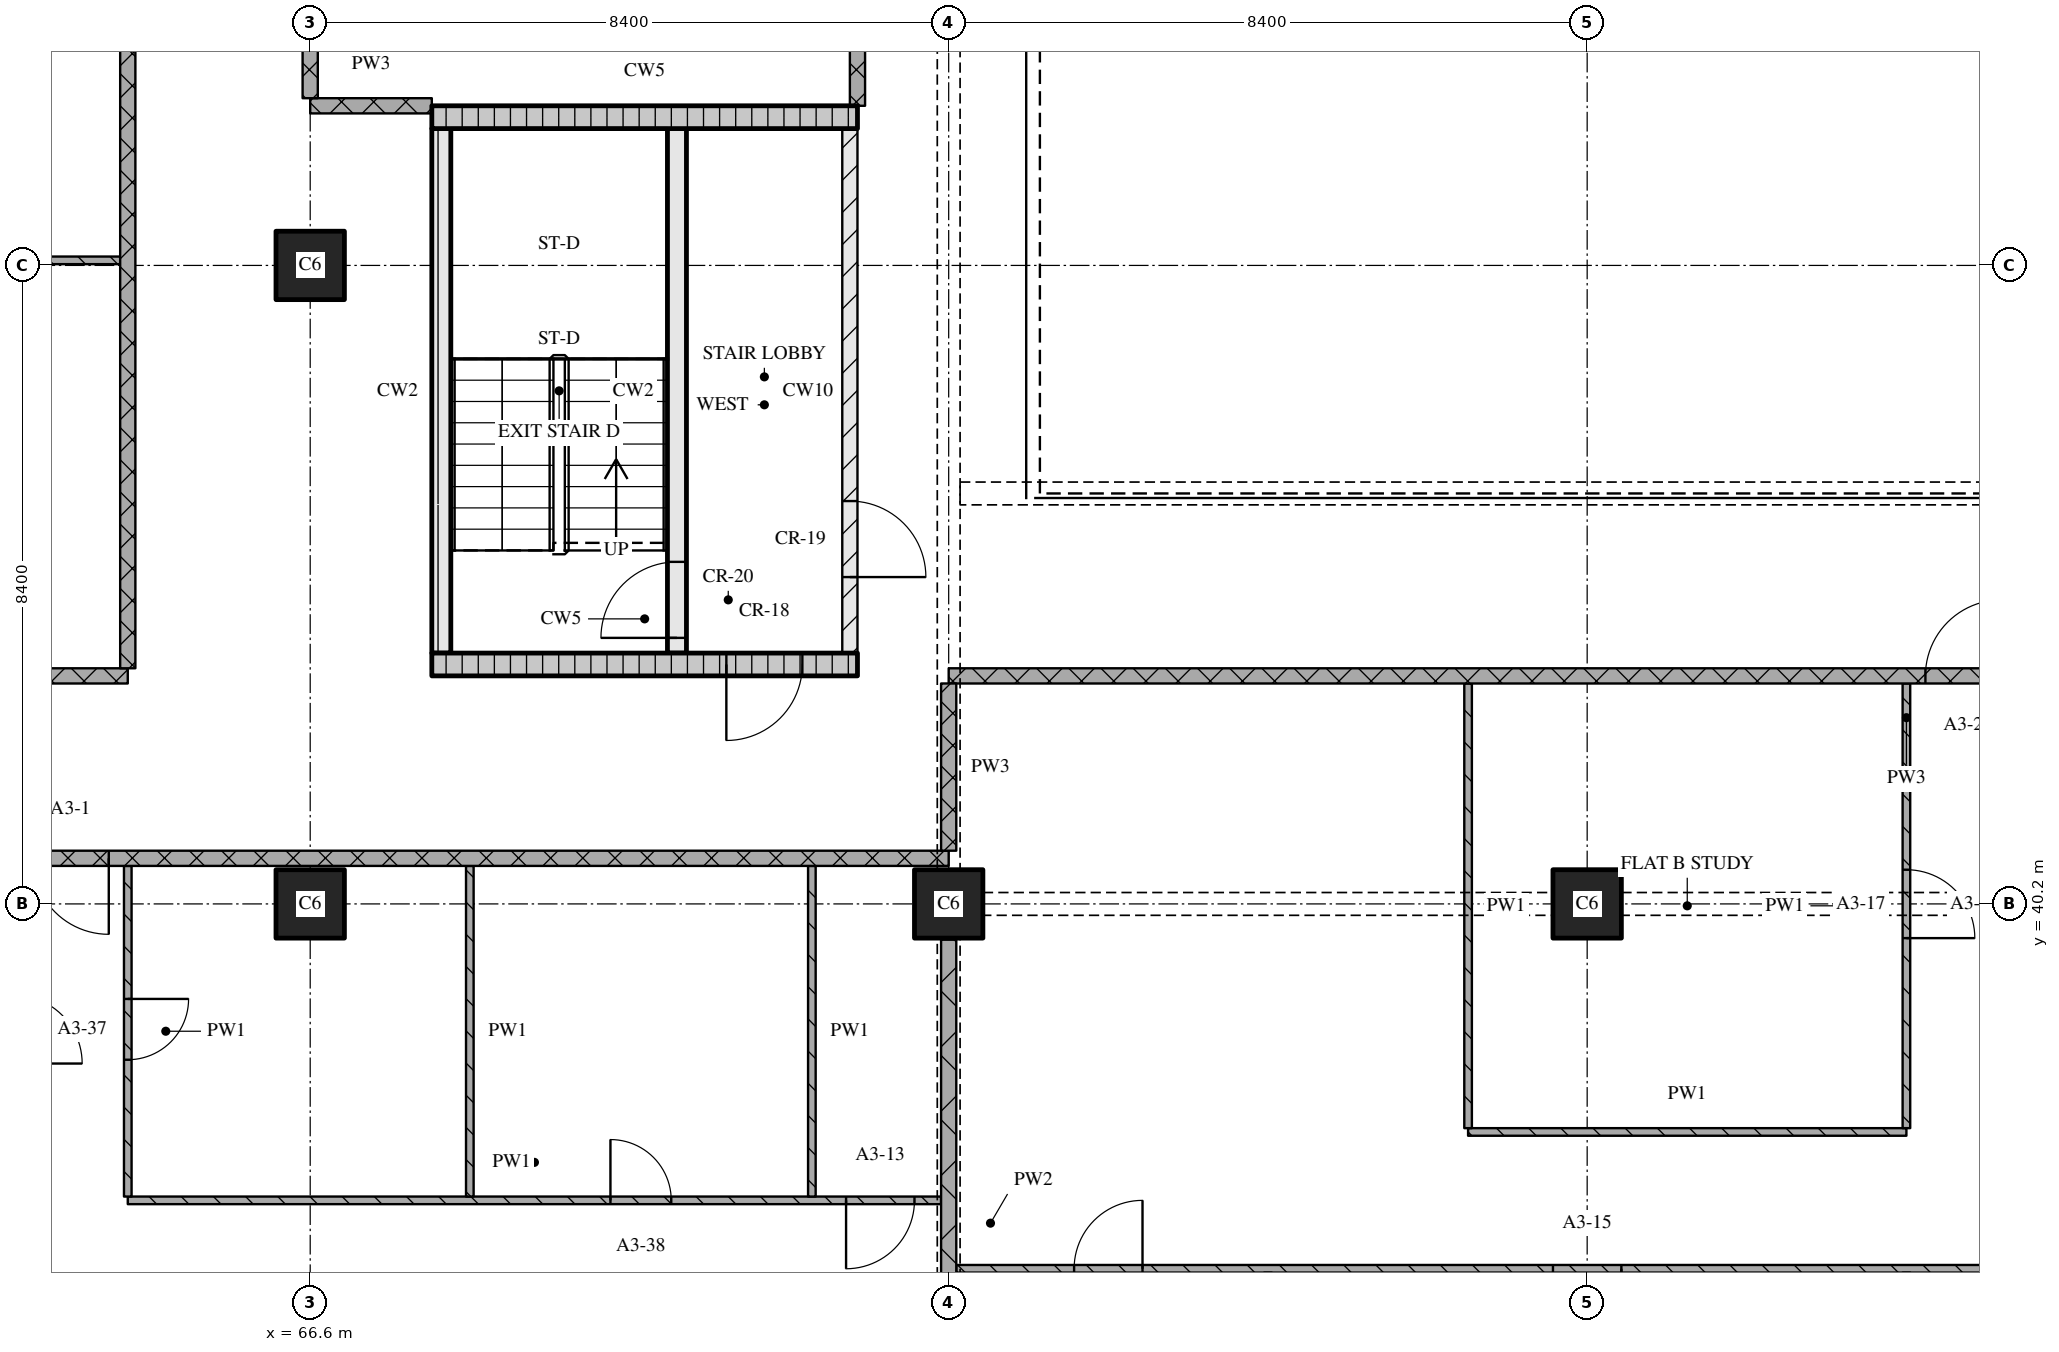
"""IFC4 building model, lengths in metres.
Left out: names, types, materials, properties, quantities, classifications, styles, units other than length and angle.
Written with IfcOpenShell. Run it as: python <this file> out.ifc"""

import sys

from ifc_helpers import new_model, si_unit, direction, frame, frame_2d, origin, origin_2d, place, context, subcontext, project, spatial, rectangle, extrude, element, fill, save


model = new_model("IFC4")
c1 = context("Model", 3, precision=1e-05, world=origin(), true_north=direction((0.0, 1.0)))
c2 = subcontext(c1, "Body", "Model", "MODEL_VIEW")
j1 = project(units=[si_unit("LENGTHUNIT", "METRE"), si_unit("PLANEANGLEUNIT", "RADIAN")], contexts=[c1])
p1 = place(None, origin())
s1 = spatial("IfcSite", under=j1, at=p1, CompositionType="ELEMENT")
p2 = place(p1, origin())
s2 = spatial("IfcBuilding", under=s1, at=p2, CompositionType="ELEMENT")
p3 = place(p2, frame((0.0, 0.0, 62.4)))
s3 = spatial("IfcBuildingStorey", under=s2, at=p3, CompositionType="ELEMENT", Elevation=62.4)
for number, where, z_axis, x_axis in (
    (1, (66.6, 40.2, 0.0), (0.0, 0.0, 1.0), (1.0, 0.0, 0.0)),
    (2, (66.6, 48.6, 0.0), (0.0, 0.0, 1.0), (1.0, 0.0, 0.0)),
    (3, (75.0, 40.2, 0.0), (0.0, 0.0, 1.0), (1.0, 0.0, 0.0)),
    (4, (83.4, 40.2, 0.0), (0.0, 0.0, 1.0), (1.0, 0.0, 0.0)),
):
    element("IfcColumn", number, at=place(p3, frame(where, z_axis=z_axis, x_axis=x_axis)), inside=s3, PredefinedType="COLUMN", context=c2, shape_type="SweptSolid", body=[
        extrude(rectangle(XDim=0.9, YDim=0.9, at=origin_2d()), origin(), (0.0, 0.0, 1.0), 3.6),
    ])
p4 = place(p3, frame((68.2, 43.35, 0.0), z_axis=(0.0, 0.0, 1.0), x_axis=(1.0, 0.0, 0.0)))
e5 = element("IfcWall", 5, at=p4, inside=s3, PredefinedType="SOLIDWALL", context=c2, shape_type="SweptSolid", body=[
    extrude(rectangle(XDim=5.6, YDim=0.3, at=frame_2d((2.8, 0.0))), origin(), (0.0, 0.0, 1.0), 3.32),
])
p5 = place(p4, frame((3.875, 0.0, 0.0)))
e6 = element("IfcOpeningElement", 6, at=p5, cuts=e5, PredefinedType="OPENING", context=c2, shape_type="SweptSolid", body=[
    extrude(rectangle(XDim=1.0, YDim=2.1, at=frame_2d((0.5, 1.05))), frame((0.0, 0.16, 0.0), z_axis=(0.0, -1.0, 0.0), x_axis=(1.0, 0.0, 0.0)), (0.0, 0.0, 1.0), 0.32),
])
p6 = place(p3, frame((68.325, 43.5, 0.0), z_axis=(0.0, 0.0, 1.0), x_axis=(0.0, 1.0, 0.0)))
e7 = element("IfcWall", 7, at=p6, inside=s3, PredefinedType="SOLIDWALL", context=c2, shape_type="SweptSolid", body=[
    extrude(rectangle(XDim=6.9, YDim=0.25, at=frame_2d((3.45, 0.0))), origin(), (0.0, 0.0, 1.0), 3.32),
])
p7 = place(p3, frame((71.425, 43.5, 0.0), z_axis=(0.0, 0.0, 1.0), x_axis=(0.0, 1.0, 0.0)))
e8 = element("IfcWall", 8, at=p7, inside=s3, PredefinedType="SOLIDWALL", context=c2, shape_type="SweptSolid", body=[
    extrude(rectangle(XDim=6.9, YDim=0.25, at=frame_2d((3.45, 0.0))), origin(), (0.0, 0.0, 1.0), 3.32),
])
p8 = place(p7, frame((0.2, 0.0, 0.0)))
e9 = element("IfcOpeningElement", 9, at=p8, cuts=e8, PredefinedType="OPENING", context=c2, shape_type="SweptSolid", body=[
    extrude(rectangle(XDim=1.0, YDim=2.1, at=frame_2d((0.5, 1.05))), frame((0.0, 0.135, 0.0), z_axis=(0.0, -1.0, 0.0), x_axis=(1.0, 0.0, 0.0)), (0.0, 0.0, 1.0), 0.27),
])
p9 = place(p3, frame((73.7, 43.5, 0.0), z_axis=(0.0, 0.0, 1.0), x_axis=(0.0, 1.0, 0.0)))
e10 = element("IfcWall", 10, at=p9, inside=s3, PredefinedType="PARTITIONING", context=c2, shape_type="SweptSolid", body=[
    extrude(rectangle(XDim=6.9, YDim=0.2, at=frame_2d((3.45, 0.0))), origin(), (0.0, 0.0, 1.0), 3.32),
])
p10 = place(p9, frame((1.0, 0.0, 0.0)))
e11 = element("IfcOpeningElement", 11, at=p10, cuts=e10, PredefinedType="OPENING", context=c2, shape_type="SweptSolid", body=[
    extrude(rectangle(XDim=1.0, YDim=2.1, at=frame_2d((0.5, 1.05))), frame((0.0, 0.11, 0.0), z_axis=(0.0, -1.0, 0.0), x_axis=(1.0, 0.0, 0.0)), (0.0, 0.0, 1.0), 0.22),
])
p11 = place(p3, frame((68.2, 50.55, 0.0), z_axis=(0.0, 0.0, 1.0), x_axis=(1.0, 0.0, 0.0)))
e12 = element("IfcWall", 12, at=p11, inside=s3, PredefinedType="SOLIDWALL", context=c2, shape_type="SweptSolid", body=[
    extrude(rectangle(XDim=5.6, YDim=0.3, at=frame_2d((2.8, 0.0))), origin(), (0.0, 0.0, 1.0), 3.32),
])
p12 = place(p3, frame((96.0, 35.4, 0.0), z_axis=(0.0, 0.0, 1.0), x_axis=(-1.0, 0.0, 0.0)))
e13 = element("IfcWall", 13, at=p12, inside=s3, PredefinedType="PARTITIONING", context=c2, shape_type="SweptSolid", body=[
    extrude(rectangle(XDim=20.9, YDim=0.1, at=frame_2d((10.45, 0.0))), origin(), (0.0, 0.0, 1.0), 3.32),
])
p13 = place(p12, frame((12.15, 0.0, 0.0)))
e14 = element("IfcOpeningElement", 14, at=p13, cuts=e13, PredefinedType="OPENING", context=c2, shape_type="SweptSolid", body=[
    extrude(rectangle(XDim=0.9, YDim=2.1, at=frame_2d((0.45, 1.05))), frame((0.0, 0.06, 0.0), z_axis=(0.0, -1.0, 0.0), x_axis=(1.0, 0.0, 0.0)), (0.0, 0.0, 1.0), 0.12),
])
p14 = place(p12, frame((18.45, 0.0, 0.0)))
e15 = element("IfcOpeningElement", 15, at=p14, cuts=e13, PredefinedType="OPENING", context=c2, shape_type="SweptSolid", body=[
    extrude(rectangle(XDim=0.9, YDim=2.1, at=frame_2d((0.45, 1.05))), frame((0.0, 0.06, 0.0), z_axis=(0.0, -1.0, 0.0), x_axis=(1.0, 0.0, 0.0)), (0.0, 0.0, 1.0), 0.12),
])
p15 = place(p3, frame((64.2, 36.3, 0.0), z_axis=(0.0, 0.0, 1.0), x_axis=(1.0, 0.0, 0.0)))
e16 = element("IfcWall", 16, at=p15, inside=s3, PredefinedType="PARTITIONING", context=c2, shape_type="SweptSolid", body=[
    extrude(rectangle(XDim=10.7, YDim=0.1, at=frame_2d((5.35, 0.0))), origin(), (0.0, 0.0, 1.0), 3.32),
])
p16 = place(p15, frame((6.35, 0.0, 0.0)))
e17 = element("IfcOpeningElement", 17, at=p16, cuts=e16, PredefinedType="OPENING", context=c2, shape_type="SweptSolid", body=[
    extrude(rectangle(XDim=0.8, YDim=2.1, at=frame_2d((0.4, 1.05))), frame((0.0, 0.06, 0.0), z_axis=(0.0, -1.0, 0.0), x_axis=(1.0, 0.0, 0.0)), (0.0, 0.0, 1.0), 0.12),
])
p17 = place(p15, frame((9.45, 0.0, 0.0)))
e18 = element("IfcOpeningElement", 18, at=p17, cuts=e16, PredefinedType="OPENING", context=c2, shape_type="SweptSolid", body=[
    extrude(rectangle(XDim=0.9, YDim=2.1, at=frame_2d((0.45, 1.05))), frame((0.0, 0.06, 0.0), z_axis=(0.0, -1.0, 0.0), x_axis=(1.0, 0.0, 0.0)), (0.0, 0.0, 1.0), 0.12),
])
p18 = place(p3, frame((81.833, 37.2, 0.0), z_axis=(0.0, 0.0, 1.0), x_axis=(1.0, 0.0, 0.0)))
e19 = element("IfcWall", 19, at=p18, inside=s3, PredefinedType="PARTITIONING", context=c2, shape_type="SweptSolid", body=[
    extrude(rectangle(XDim=5.767, YDim=0.1, at=frame_2d((2.883, 0.0))), origin(), (0.0, 0.0, 1.0), 3.32),
])
p19 = place(p3, frame((75.0, 40.8, 0.0), z_axis=(0.0, 0.0, 1.0), x_axis=(-1.0, 0.0, 0.0)))
e20 = element("IfcWall", 20, at=p19, inside=s3, PredefinedType="PARTITIONING", context=c2, shape_type="SweptSolid", body=[
    extrude(rectangle(XDim=24.08, YDim=0.2, at=frame_2d((12.04, 0.0))), origin(), (0.0, 0.0, 1.0), 3.32),
])
p20 = place(p19, frame((11.05, 0.0, 0.0)))
e21 = element("IfcOpeningElement", 21, at=p20, cuts=e20, PredefinedType="OPENING", context=c2, shape_type="SweptSolid", body=[
    extrude(rectangle(XDim=1.0, YDim=2.1, at=frame_2d((0.5, 1.05))), frame((0.0, 0.11, 0.0), z_axis=(0.0, -1.0, 0.0), x_axis=(1.0, 0.0, 0.0)), (0.0, 0.0, 1.0), 0.22),
])
p21 = place(p3, frame((48.28, 43.2, 0.0), z_axis=(0.0, 0.0, 1.0), x_axis=(1.0, 0.0, 0.0)))
e22 = element("IfcWall", 22, at=p21, inside=s3, PredefinedType="PARTITIONING", context=c2, shape_type="SweptSolid", body=[
    extrude(rectangle(XDim=15.92, YDim=0.2, at=frame_2d((7.96, 0.0))), origin(), (0.0, 0.0, 1.0), 3.32),
])
p22 = place(p3, frame((100.2, 43.2, 0.0), z_axis=(0.0, 0.0, 1.0), x_axis=(-1.0, 0.0, 0.0)))
e23 = element("IfcWall", 23, at=p22, inside=s3, PredefinedType="PARTITIONING", context=c2, shape_type="SweptSolid", body=[
    extrude(rectangle(XDim=25.2, YDim=0.2, at=frame_2d((12.6, 0.0))), origin(), (0.0, 0.0, 1.0), 3.32),
])
p23 = place(p22, frame((11.35, 0.0, 0.0)))
e24 = element("IfcOpeningElement", 24, at=p23, cuts=e23, PredefinedType="OPENING", context=c2, shape_type="SweptSolid", body=[
    extrude(rectangle(XDim=1.0, YDim=2.1, at=frame_2d((0.5, 1.05))), frame((0.0, 0.11, 0.0), z_axis=(0.0, -1.0, 0.0), x_axis=(1.0, 0.0, 0.0)), (0.0, 0.0, 1.0), 0.22),
])
p24 = place(p3, frame((58.67, 48.667, 0.0), z_axis=(0.0, 0.0, 1.0), x_axis=(1.0, 0.0, 0.0)))
e25 = element("IfcWall", 25, at=p24, inside=s3, PredefinedType="PARTITIONING", context=c2, shape_type="SweptSolid", body=[
    extrude(rectangle(XDim=5.43, YDim=0.1, at=frame_2d((2.715, 0.0))), origin(), (0.0, 0.0, 1.0), 3.32),
])
p25 = place(p3, frame((66.6, 50.7, 0.0), z_axis=(0.0, 0.0, 1.0), x_axis=(1.0, 0.0, 0.0)))
e26 = element("IfcWall", 26, at=p25, inside=s3, PredefinedType="PARTITIONING", context=c2, shape_type="SweptSolid", body=[
    extrude(rectangle(XDim=1.6, YDim=0.2, at=frame_2d((0.8, 0.0))), origin(), (0.0, 0.0, 1.0), 3.32),
])
p26 = place(p3, frame((64.2, 43.3, 0.0), z_axis=(0.0, 0.0, 1.0), x_axis=(0.0, 1.0, 0.0)))
e27 = element("IfcWall", 27, at=p26, inside=s3, PredefinedType="PARTITIONING", context=c2, shape_type="SweptSolid", body=[
    extrude(rectangle(XDim=32.02, YDim=0.2, at=frame_2d((16.01, 0.0))), origin(), (0.0, 0.0, 1.0), 3.32),
])
p27 = place(p26, frame((9.15, 0.0, 0.0)))
e28 = element("IfcOpeningElement", 28, at=p27, cuts=e27, PredefinedType="OPENING", context=c2, shape_type="SweptSolid", body=[
    extrude(rectangle(XDim=1.0, YDim=2.1, at=frame_2d((0.5, 1.05))), frame((0.0, 0.11, 0.0), z_axis=(0.0, -1.0, 0.0), x_axis=(1.0, 0.0, 0.0)), (0.0, 0.0, 1.0), 0.22),
])
p28 = place(p26, frame((19.05, 0.0, 0.0)))
e29 = element("IfcOpeningElement", 29, at=p28, cuts=e27, PredefinedType="OPENING", context=c2, shape_type="SweptSolid", body=[
    extrude(rectangle(XDim=1.0, YDim=2.1, at=frame_2d((0.5, 1.05))), frame((0.0, 0.11, 0.0), z_axis=(0.0, -1.0, 0.0), x_axis=(1.0, 0.0, 0.0)), (0.0, 0.0, 1.0), 0.22),
])
p29 = place(p3, frame((64.2, 40.7, 0.0), z_axis=(0.0, 0.0, 1.0), x_axis=(0.0, -1.0, 0.0)))
e30 = element("IfcWall", 30, at=p29, inside=s3, PredefinedType="PARTITIONING", context=c2, shape_type="SweptSolid", body=[
    extrude(rectangle(XDim=4.35, YDim=0.1, at=frame_2d((2.175, 0.0))), origin(), (0.0, 0.0, 1.0), 3.32),
])
p30 = place(p29, frame((1.75, 0.0, 0.0)))
e31 = element("IfcOpeningElement", 31, at=p30, cuts=e30, PredefinedType="OPENING", context=c2, shape_type="SweptSolid", body=[
    extrude(rectangle(XDim=0.8, YDim=2.1, at=frame_2d((0.4, 1.05))), frame((0.0, 0.06, 0.0), z_axis=(0.0, -1.0, 0.0), x_axis=(1.0, 0.0, 0.0)), (0.0, 0.0, 1.0), 0.12),
])
p31 = place(p3, frame((66.6, 56.53, 0.0), z_axis=(0.0, 0.0, 1.0), x_axis=(0.0, -1.0, 0.0)))
e32 = element("IfcWall", 32, at=p31, inside=s3, PredefinedType="PARTITIONING", context=c2, shape_type="SweptSolid", body=[
    extrude(rectangle(XDim=5.73, YDim=0.2, at=frame_2d((2.865, 0.0))), origin(), (0.0, 0.0, 1.0), 3.32),
])
for number, where, z_axis, x_axis in (
    (33, (68.7, 40.7, 0.0), (0.0, 0.0, 1.0), (0.0, -1.0, 0.0)),
    (34, (73.2, 40.7, 0.0), (0.0, 0.0, 1.0), (0.0, -1.0, 0.0)),
):
    element("IfcWall", number, at=place(p3, frame(where, z_axis=z_axis, x_axis=x_axis)), inside=s3, PredefinedType="PARTITIONING", context=c2, shape_type="SweptSolid", body=[
        extrude(rectangle(XDim=4.35, YDim=0.1, at=frame_2d((2.175, 0.0))), origin(), (0.0, 0.0, 1.0), 3.32),
    ])
p32 = place(p3, frame((73.8, 58.7, 0.0), z_axis=(0.0, 0.0, 1.0), x_axis=(0.0, -1.0, 0.0)))
e35 = element("IfcWall", 35, at=p32, inside=s3, PredefinedType="PARTITIONING", context=c2, shape_type="SweptSolid", body=[
    extrude(rectangle(XDim=8.0, YDim=0.2, at=frame_2d((4.0, 0.0))), origin(), (0.0, 0.0, 1.0), 3.32),
])
p33 = place(p3, frame((75.0, 43.1, 0.0), z_axis=(0.0, 0.0, 1.0), x_axis=(0.0, -1.0, 0.0)))
e36 = element("IfcWall", 36, at=p33, inside=s3, PredefinedType="PARTITIONING", context=c2, shape_type="SweptSolid", body=[
    extrude(rectangle(XDim=2.2, YDim=0.2, at=frame_2d((1.1, 0.0))), origin(), (0.0, 0.0, 1.0), 2.43),
])
p34 = place(p3, frame((75.0, 39.73, 0.0), z_axis=(0.0, 0.0, 1.0), x_axis=(0.0, -1.0, 0.0)))
e37 = element("IfcWall", 37, at=p34, inside=s3, PredefinedType="PARTITIONING", context=c2, shape_type="SweptSolid", body=[
    extrude(rectangle(XDim=7.46, YDim=0.2, at=frame_2d((3.73, 0.0))), origin(), (0.0, 0.0, 1.0), 2.83),
])
p35 = place(p3, frame((81.833, 43.1, 0.0), z_axis=(0.0, 0.0, 1.0), x_axis=(0.0, -1.0, 0.0)))
e38 = element("IfcWall", 38, at=p35, inside=s3, PredefinedType="PARTITIONING", context=c2, shape_type="SweptSolid", body=[
    extrude(rectangle(XDim=5.85, YDim=0.1, at=frame_2d((2.925, 0.0))), origin(), (0.0, 0.0, 1.0), 3.32),
])
p36 = place(p3, frame((87.6, 37.25, 0.0), z_axis=(0.0, 0.0, 1.0), x_axis=(0.0, 1.0, 0.0)))
e39 = element("IfcWall", 39, at=p36, inside=s3, PredefinedType="PARTITIONING", context=c2, shape_type="SweptSolid", body=[
    extrude(rectangle(XDim=5.85, YDim=0.1, at=frame_2d((2.925, 0.0))), origin(), (0.0, 0.0, 1.0), 3.32),
])
p37 = place(p36, frame((2.5, 0.0, 0.0)))
e40 = element("IfcOpeningElement", 40, at=p37, cuts=e39, PredefinedType="OPENING", context=c2, shape_type="SweptSolid", body=[
    extrude(rectangle(XDim=0.9, YDim=2.1, at=frame_2d((0.45, 1.05))), frame((0.0, 0.06, 0.0), z_axis=(0.0, -1.0, 0.0), x_axis=(1.0, 0.0, 0.0)), (0.0, 0.0, 1.0), 0.12),
])
p38 = place(p5, origin())
e41 = element("IfcDoor", 41, at=p38, inside=s3, OperationType="SINGLE_SWING_RIGHT", PredefinedType="DOOR", context=c2, shape_type="SweptSolid", body=[
    extrude(rectangle(XDim=1.0, YDim=2.1, at=frame_2d((0.5, 1.05))), frame((0.0, 0.025, 0.0), z_axis=(0.0, -1.0, 0.0), x_axis=(1.0, 0.0, 0.0)), (0.0, 0.0, 1.0), 0.05),
])
fill(e6, e41)
p39 = place(p8, origin())
e42 = element("IfcDoor", 42, at=p39, inside=s3, OperationType="SINGLE_SWING_LEFT", PredefinedType="DOOR", context=c2, shape_type="SweptSolid", body=[
    extrude(rectangle(XDim=1.0, YDim=2.1, at=frame_2d((0.5, 1.05))), frame((0.0, 0.025, 0.0), z_axis=(0.0, -1.0, 0.0), x_axis=(1.0, 0.0, 0.0)), (0.0, 0.0, 1.0), 0.05),
])
fill(e9, e42)
p40 = place(p10, origin())
e43 = element("IfcDoor", 43, at=p40, inside=s3, OperationType="SINGLE_SWING_RIGHT", PredefinedType="DOOR", context=c2, shape_type="SweptSolid", body=[
    extrude(rectangle(XDim=1.0, YDim=2.1, at=frame_2d((0.5, 1.05))), frame((0.0, 0.025, 0.0), z_axis=(0.0, -1.0, 0.0), x_axis=(1.0, 0.0, 0.0)), (0.0, 0.0, 1.0), 0.05),
])
fill(e11, e43)
p41 = place(p13, origin())
e44 = element("IfcDoor", 44, at=p41, inside=s3, OperationType="SINGLE_SWING_LEFT", PredefinedType="DOOR", context=c2, shape_type="SweptSolid", body=[
    extrude(rectangle(XDim=0.9, YDim=2.1, at=frame_2d((0.45, 1.05))), frame((0.0, 0.025, 0.0), z_axis=(0.0, -1.0, 0.0), x_axis=(1.0, 0.0, 0.0)), (0.0, 0.0, 1.0), 0.05),
])
fill(e14, e44)
p42 = place(p14, origin())
e45 = element("IfcDoor", 45, at=p42, inside=s3, OperationType="SINGLE_SWING_RIGHT", PredefinedType="DOOR", context=c2, shape_type="SweptSolid", body=[
    extrude(rectangle(XDim=0.9, YDim=2.1, at=frame_2d((0.45, 1.05))), frame((0.0, 0.025, 0.0), z_axis=(0.0, -1.0, 0.0), x_axis=(1.0, 0.0, 0.0)), (0.0, 0.0, 1.0), 0.05),
])
fill(e15, e45)
p43 = place(p16, origin())
e46 = element("IfcDoor", 46, at=p43, inside=s3, OperationType="SINGLE_SWING_LEFT", PredefinedType="DOOR", context=c2, shape_type="SweptSolid", body=[
    extrude(rectangle(XDim=0.8, YDim=2.1, at=frame_2d((0.4, 1.05))), frame((0.0, 0.025, 0.0), z_axis=(0.0, -1.0, 0.0), x_axis=(1.0, 0.0, 0.0)), (0.0, 0.0, 1.0), 0.05),
])
fill(e17, e46)
p44 = place(p17, origin())
e47 = element("IfcDoor", 47, at=p44, inside=s3, OperationType="SINGLE_SWING_RIGHT", PredefinedType="DOOR", context=c2, shape_type="SweptSolid", body=[
    extrude(rectangle(XDim=0.9, YDim=2.1, at=frame_2d((0.45, 1.05))), frame((0.0, 0.025, 0.0), z_axis=(0.0, -1.0, 0.0), x_axis=(1.0, 0.0, 0.0)), (0.0, 0.0, 1.0), 0.05),
])
fill(e18, e47)
p45 = place(p20, origin())
e48 = element("IfcDoor", 48, at=p45, inside=s3, OperationType="SINGLE_SWING_LEFT", PredefinedType="DOOR", context=c2, shape_type="SweptSolid", body=[
    extrude(rectangle(XDim=1.0, YDim=2.1, at=frame_2d((0.5, 1.05))), frame((0.0, 0.025, 0.0), z_axis=(0.0, -1.0, 0.0), x_axis=(1.0, 0.0, 0.0)), (0.0, 0.0, 1.0), 0.05),
])
fill(e21, e48)
p46 = place(p23, origin())
e49 = element("IfcDoor", 49, at=p46, inside=s3, OperationType="SINGLE_SWING_RIGHT", PredefinedType="DOOR", context=c2, shape_type="SweptSolid", body=[
    extrude(rectangle(XDim=1.0, YDim=2.1, at=frame_2d((0.5, 1.05))), frame((0.0, 0.025, 0.0), z_axis=(0.0, -1.0, 0.0), x_axis=(1.0, 0.0, 0.0)), (0.0, 0.0, 1.0), 0.05),
])
fill(e24, e49)
p47 = place(p30, origin())
e50 = element("IfcDoor", 50, at=p47, inside=s3, OperationType="SINGLE_SWING_LEFT", PredefinedType="DOOR", context=c2, shape_type="SweptSolid", body=[
    extrude(rectangle(XDim=0.8, YDim=2.1, at=frame_2d((0.4, 1.05))), frame((0.0, 0.025, 0.0), z_axis=(0.0, -1.0, 0.0), x_axis=(1.0, 0.0, 0.0)), (0.0, 0.0, 1.0), 0.05),
])
fill(e31, e50)
p48 = place(p37, origin())
e51 = element("IfcDoor", 51, at=p48, inside=s3, OperationType="SINGLE_SWING_RIGHT", PredefinedType="DOOR", context=c2, shape_type="SweptSolid", body=[
    extrude(rectangle(XDim=0.9, YDim=2.1, at=frame_2d((0.45, 1.05))), frame((0.0, 0.025, 0.0), z_axis=(0.0, -1.0, 0.0), x_axis=(1.0, 0.0, 0.0)), (0.0, 0.0, 1.0), 0.05),
])
fill(e40, e51)
save(model, sys.argv[1])
